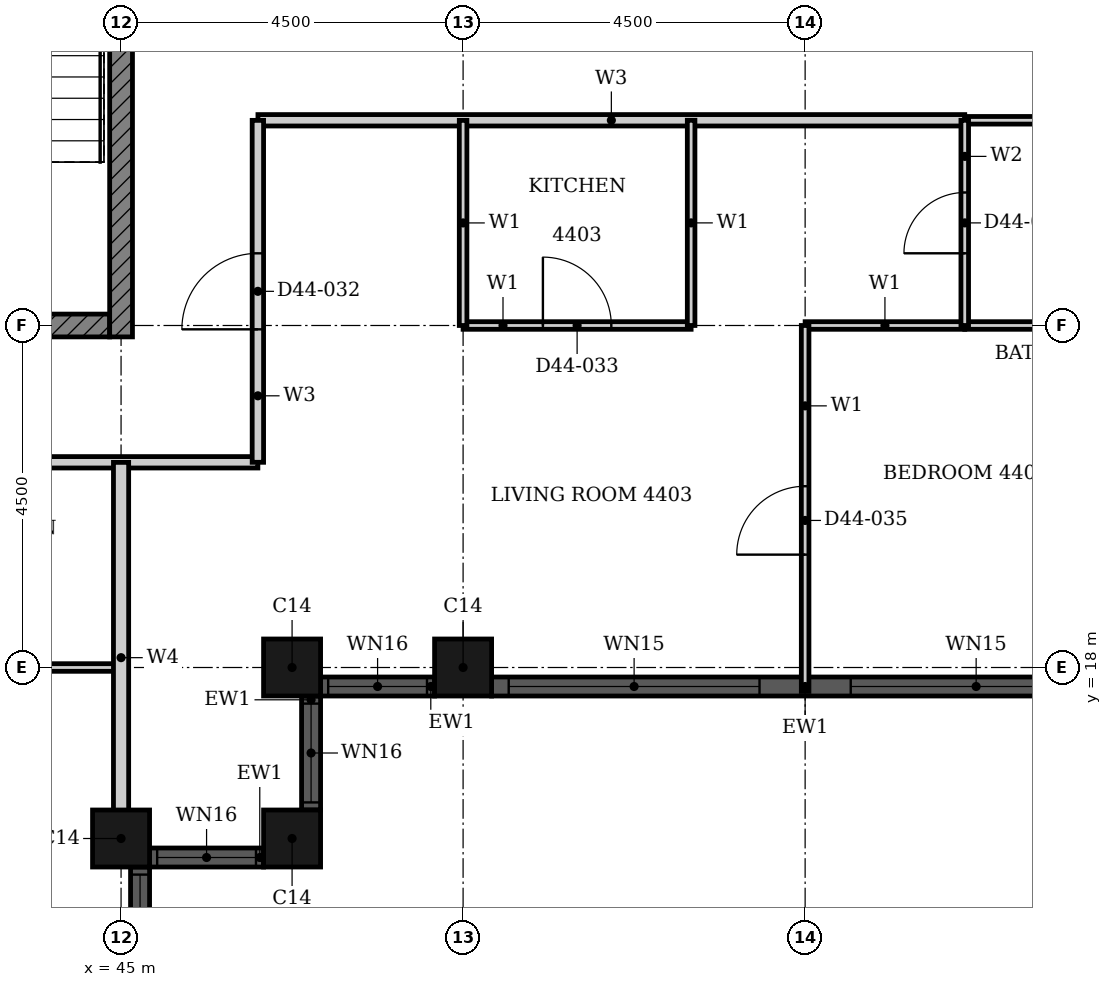
"""IFC4 building model, lengths in metres.
Left out: names, types, materials, properties, quantities, classifications, styles, units other than length and angle.
Written with IfcOpenShell. Run it as: python <this file> out.ifc"""

import sys

from ifc_helpers import new_model, si_unit, direction, frame, frame_2d, origin, origin_2d, place, context, subcontext, project, spatial, rectangle, hollow_rectangle, extrude, element, fill, save


model = new_model("IFC4")
c1 = context("Model", 3, precision=1e-05, world=origin(), true_north=direction((0.0, 1.0)))
c2 = subcontext(c1, "Body", "Model", "MODEL_VIEW")
j1 = project(units=[si_unit("LENGTHUNIT", "METRE"), si_unit("PLANEANGLEUNIT", "RADIAN")], contexts=[c1])
p1 = place(None, origin())
s1 = spatial("IfcSite", under=j1, at=p1, CompositionType="ELEMENT")
p2 = place(p1, origin())
s2 = spatial("IfcBuilding", under=s1, at=p2, CompositionType="ELEMENT")
p3 = place(p2, frame((0.0, 0.0, 176.5)))
s3 = spatial("IfcBuildingStorey", under=s2, at=p3, CompositionType="ELEMENT", Elevation=176.5)
for number, where, z_axis, x_axis in (
    (1, (45.0, 15.75, 0.0), (0.0, 0.0, 1.0), (1.0, 0.0, 0.0)),
    (2, (47.25, 15.75, 0.0), (0.0, 0.0, 1.0), (1.0, 0.0, 0.0)),
    (3, (47.25, 18.0, 0.0), (0.0, 0.0, 1.0), (1.0, 0.0, 0.0)),
    (4, (49.5, 18.0, 0.0), (0.0, 0.0, 1.0), (1.0, 0.0, 0.0)),
):
    element("IfcColumn", number, at=place(p3, frame(where, z_axis=z_axis, x_axis=x_axis)), inside=s3, PredefinedType="COLUMN", context=c2, shape_type="SweptSolid", body=[
        extrude(hollow_rectangle(XDim=0.75, YDim=0.75, WallThickness=0.024, at=origin_2d()), origin(), (0.0, 0.0, 1.0), 3.7),
    ])
p4 = place(p3, frame((45.25, 13.875, 0.0), z_axis=(0.0, 0.0, 1.0), x_axis=(0.0, 1.0, 0.0)))
e5 = element("IfcWall", 5, at=p4, inside=s3, PredefinedType="SOLIDWALL", context=c2, shape_type="SweptSolid", body=[
    extrude(rectangle(XDim=1.5, YDim=0.25, at=frame_2d((0.75, 0.0))), origin(), (0.0, 0.0, 1.0), 3.7),
])
p5 = place(p4, frame((0.1, 0.0, 0.9)))
e6 = element("IfcOpeningElement", 6, at=p5, cuts=e5, PredefinedType="OPENING", context=c2, shape_type="SweptSolid", body=[
    extrude(rectangle(XDim=1.3, YDim=1.85, at=frame_2d((0.65, 0.925))), frame((0.0, 0.135, 0.0), z_axis=(0.0, -1.0, 0.0), x_axis=(1.0, 0.0, 0.0)), (0.0, 0.0, 1.0), 0.27),
])
p6 = place(p3, frame((45.375, 15.5, 0.0), z_axis=(0.0, 0.0, 1.0), x_axis=(1.0, 0.0, 0.0)))
e7 = element("IfcWall", 7, at=p6, inside=s3, PredefinedType="SOLIDWALL", context=c2, shape_type="SweptSolid", body=[
    extrude(rectangle(XDim=1.5, YDim=0.25, at=frame_2d((0.75, 0.0))), origin(), (0.0, 0.0, 1.0), 3.7),
])
p7 = place(p6, frame((0.1, 0.0, 0.9)))
e8 = element("IfcOpeningElement", 8, at=p7, cuts=e7, PredefinedType="OPENING", context=c2, shape_type="SweptSolid", body=[
    extrude(rectangle(XDim=1.3, YDim=1.85, at=frame_2d((0.65, 0.925))), frame((0.0, 0.135, 0.0), z_axis=(0.0, -1.0, 0.0), x_axis=(1.0, 0.0, 0.0)), (0.0, 0.0, 1.0), 0.27),
])
p8 = place(p3, frame((47.5, 16.125, 0.0), z_axis=(0.0, 0.0, 1.0), x_axis=(0.0, 1.0, 0.0)))
e9 = element("IfcWall", 9, at=p8, inside=s3, PredefinedType="SOLIDWALL", context=c2, shape_type="SweptSolid", body=[
    extrude(rectangle(XDim=1.5, YDim=0.25, at=frame_2d((0.75, 0.0))), origin(), (0.0, 0.0, 1.0), 3.7),
])
p9 = place(p8, frame((0.1, 0.0, 0.9)))
e10 = element("IfcOpeningElement", 10, at=p9, cuts=e9, PredefinedType="OPENING", context=c2, shape_type="SweptSolid", body=[
    extrude(rectangle(XDim=1.3, YDim=1.85, at=frame_2d((0.65, 0.925))), frame((0.0, 0.135, 0.0), z_axis=(0.0, -1.0, 0.0), x_axis=(1.0, 0.0, 0.0)), (0.0, 0.0, 1.0), 0.27),
])
p10 = place(p3, frame((47.625, 17.75, 0.0), z_axis=(0.0, 0.0, 1.0), x_axis=(1.0, 0.0, 0.0)))
e11 = element("IfcWall", 11, at=p10, inside=s3, PredefinedType="SOLIDWALL", context=c2, shape_type="SweptSolid", body=[
    extrude(rectangle(XDim=1.5, YDim=0.25, at=frame_2d((0.75, 0.0))), origin(), (0.0, 0.0, 1.0), 3.7),
])
p11 = place(p10, frame((0.1, 0.0, 0.9)))
e12 = element("IfcOpeningElement", 12, at=p11, cuts=e11, PredefinedType="OPENING", context=c2, shape_type="SweptSolid", body=[
    extrude(rectangle(XDim=1.3, YDim=1.85, at=frame_2d((0.65, 0.925))), frame((0.0, 0.135, 0.0), z_axis=(0.0, -1.0, 0.0), x_axis=(1.0, 0.0, 0.0)), (0.0, 0.0, 1.0), 0.27),
])
p12 = place(p3, frame((49.875, 17.75, 0.0), z_axis=(0.0, 0.0, 1.0), x_axis=(1.0, 0.0, 0.0)))
e13 = element("IfcWall", 13, at=p12, inside=s3, PredefinedType="SOLIDWALL", context=c2, shape_type="SweptSolid", body=[
    extrude(rectangle(XDim=8.25, YDim=0.25, at=frame_2d((4.125, 0.0))), origin(), (0.0, 0.0, 1.0), 3.7),
])
p13 = place(p12, frame((0.225, 0.0, 0.45)))
e14 = element("IfcOpeningElement", 14, at=p13, cuts=e13, PredefinedType="OPENING", context=c2, shape_type="SweptSolid", body=[
    extrude(rectangle(XDim=3.3, YDim=2.3, at=frame_2d((1.65, 1.15))), frame((0.0, 0.135, 0.0), z_axis=(0.0, -1.0, 0.0), x_axis=(1.0, 0.0, 0.0)), (0.0, 0.0, 1.0), 0.27),
])
p14 = place(p12, frame((4.725, 0.0, 0.45)))
e15 = element("IfcOpeningElement", 15, at=p14, cuts=e13, PredefinedType="OPENING", context=c2, shape_type="SweptSolid", body=[
    extrude(rectangle(XDim=3.3, YDim=2.3, at=frame_2d((1.65, 1.15))), frame((0.0, 0.135, 0.0), z_axis=(0.0, -1.0, 0.0), x_axis=(1.0, 0.0, 0.0)), (0.0, 0.0, 1.0), 0.27),
])
p15 = place(p3, frame((32.911, 22.5, 0.0), z_axis=(0.0, 0.0, 1.0), x_axis=(1.0, 0.0, 0.0)))
e16 = element("IfcWall", 16, at=p15, inside=s3, PredefinedType="SHEAR", context=c2, shape_type="SweptSolid", body=[
    extrude(rectangle(XDim=11.939, YDim=0.3, at=frame_2d((5.97, 0.0))), origin(), (0.0, 0.0, 1.0), 3.4),
])
p16 = place(p15, frame((5.404, 0.0, 0.0)))
e17 = element("IfcOpeningElement", 17, at=p16, cuts=e16, PredefinedType="OPENING", context=c2, shape_type="SweptSolid", body=[
    extrude(rectangle(XDim=1.8, YDim=2.1, at=frame_2d((0.9, 1.05))), frame((0.0, 0.16, 0.0), z_axis=(0.0, -1.0, 0.0), x_axis=(1.0, 0.0, 0.0)), (0.0, 0.0, 1.0), 0.32),
])
p17 = place(p3, frame((45.0, 22.35, 0.0), z_axis=(0.0, 0.0, 1.0), x_axis=(0.0, 1.0, 0.0)))
e18 = element("IfcWall", 18, at=p17, inside=s3, PredefinedType="SHEAR", context=c2, shape_type="SweptSolid", body=[
    extrude(rectangle(XDim=9.3, YDim=0.3, at=frame_2d((4.65, 0.0))), origin(), (0.0, 0.0, 1.0), 3.4),
])
p18 = place(p3, frame((38.4, 20.7, 0.0), z_axis=(0.0, 0.0, 1.0), x_axis=(1.0, 0.0, 0.0)))
e19 = element("IfcWall", 19, at=p18, inside=s3, PredefinedType="PARTITIONING", context=c2, shape_type="SweptSolid", body=[
    extrude(rectangle(XDim=8.4, YDim=0.15, at=frame_2d((4.2, 0.0))), origin(), (0.0, 0.0, 1.0), 3.4),
])
p19 = place(p3, frame((46.801, 25.2, 0.0), z_axis=(0.0, 0.0, 1.0), x_axis=(1.0, 0.0, 0.0)))
e20 = element("IfcWall", 20, at=p19, inside=s3, PredefinedType="PARTITIONING", context=c2, shape_type="SweptSolid", body=[
    extrude(rectangle(XDim=9.299, YDim=0.15, at=frame_2d((4.649, 0.0))), origin(), (0.0, 0.0, 1.0), 3.4),
])
p20 = place(p3, frame((46.8, 20.7, 0.0), z_axis=(0.0, 0.0, 1.0), x_axis=(0.0, 1.0, 0.0)))
e21 = element("IfcWall", 21, at=p20, inside=s3, PredefinedType="PARTITIONING", context=c2, shape_type="SweptSolid", body=[
    extrude(rectangle(XDim=4.499, YDim=0.15, at=frame_2d((2.25, 0.0))), origin(), (0.0, 0.0, 1.0), 3.4),
])
p21 = place(p20, frame((1.75, 0.0, 0.0)))
e22 = element("IfcOpeningElement", 22, at=p21, cuts=e21, PredefinedType="OPENING", context=c2, shape_type="SweptSolid", body=[
    extrude(rectangle(XDim=1.0, YDim=2.2, at=frame_2d((0.5, 1.1))), frame((0.0, 0.085, 0.0), z_axis=(0.0, -1.0, 0.0), x_axis=(1.0, 0.0, 0.0)), (0.0, 0.0, 1.0), 0.17),
])
p22 = place(p3, frame((42.0, 18.0, 0.0), z_axis=(0.0, 0.0, 1.0), x_axis=(1.0, 0.0, 0.0)))
e23 = element("IfcWall", 23, at=p22, inside=s3, PredefinedType="PARTITIONING", context=c2, shape_type="SweptSolid", body=[
    extrude(rectangle(XDim=3.0, YDim=0.1, at=frame_2d((1.5, 0.0))), origin(), (0.0, 0.0, 1.0), 3.4),
])
p23 = place(p22, frame((1.05, 0.0, 0.0)))
e24 = element("IfcOpeningElement", 24, at=p23, cuts=e23, PredefinedType="OPENING", context=c2, shape_type="SweptSolid", body=[
    extrude(rectangle(XDim=0.9, YDim=2.1, at=frame_2d((0.45, 1.05))), frame((0.0, 0.06, 0.0), z_axis=(0.0, -1.0, 0.0), x_axis=(1.0, 0.0, 0.0)), (0.0, 0.0, 1.0), 0.12),
])
p24 = place(p3, frame((54.0, 22.5, 0.0), z_axis=(0.0, 0.0, 1.0), x_axis=(1.0, 0.0, 0.0)))
e25 = element("IfcWall", 25, at=p24, inside=s3, PredefinedType="PARTITIONING", context=c2, shape_type="SweptSolid", body=[
    extrude(rectangle(XDim=2.1, YDim=0.1, at=frame_2d((1.05, 0.0))), origin(), (0.0, 0.0, 1.0), 2.68),
])
p25 = place(p3, frame((49.5, 22.5, 0.0), z_axis=(0.0, 0.0, 1.0), x_axis=(1.0, 0.0, 0.0)))
e26 = element("IfcWall", 26, at=p25, inside=s3, PredefinedType="PARTITIONING", context=c2, shape_type="SweptSolid", body=[
    extrude(rectangle(XDim=3.0, YDim=0.1, at=frame_2d((1.5, 0.0))), origin(), (0.0, 0.0, 1.0), 2.68),
])
p26 = place(p25, frame((1.05, 0.0, 0.0)))
e27 = element("IfcOpeningElement", 27, at=p26, cuts=e26, PredefinedType="OPENING", context=c2, shape_type="SweptSolid", body=[
    extrude(rectangle(XDim=0.9, YDim=2.1, at=frame_2d((0.45, 1.05))), frame((0.0, 0.06, 0.0), z_axis=(0.0, -1.0, 0.0), x_axis=(1.0, 0.0, 0.0)), (0.0, 0.0, 1.0), 0.12),
])
p27 = place(p3, frame((49.5, 22.5, 0.0), z_axis=(0.0, 0.0, 1.0), x_axis=(0.0, 1.0, 0.0)))
e28 = element("IfcWall", 28, at=p27, inside=s3, PredefinedType="PARTITIONING", context=c2, shape_type="SweptSolid", body=[
    extrude(rectangle(XDim=2.699, YDim=0.1, at=frame_2d((1.35, 0.0))), origin(), (0.0, 0.0, 1.0), 2.48),
])
p28 = place(p3, frame((52.5, 22.5, 0.0), z_axis=(0.0, 0.0, 1.0), x_axis=(0.0, 1.0, 0.0)))
e29 = element("IfcWall", 29, at=p28, inside=s3, PredefinedType="PARTITIONING", context=c2, shape_type="SweptSolid", body=[
    extrude(rectangle(XDim=2.7, YDim=0.1, at=frame_2d((1.35, 0.0))), origin(), (0.0, 0.0, 1.0), 3.4),
])
p29 = place(p3, frame((54.0, 17.685, 0.0), z_axis=(0.0, 0.0, 1.0), x_axis=(0.0, 1.0, 0.0)))
e30 = element("IfcWall", 30, at=p29, inside=s3, PredefinedType="PARTITIONING", context=c2, shape_type="SweptSolid", body=[
    extrude(rectangle(XDim=4.815, YDim=0.1, at=frame_2d((2.407, 0.0))), origin(), (0.0, 0.0, 1.0), 3.4),
])
p30 = place(p29, frame((1.8, 0.0, 0.0)))
e31 = element("IfcOpeningElement", 31, at=p30, cuts=e30, PredefinedType="OPENING", context=c2, shape_type="SweptSolid", body=[
    extrude(rectangle(XDim=0.9, YDim=2.1, at=frame_2d((0.45, 1.05))), frame((0.0, 0.06, 0.0), z_axis=(0.0, -1.0, 0.0), x_axis=(1.0, 0.0, 0.0)), (0.0, 0.0, 1.0), 0.12),
])
p31 = place(p3, frame((45.0, 15.56, 0.0), z_axis=(0.0, 0.0, 1.0), x_axis=(0.0, 1.0, 0.0)))
e32 = element("IfcWall", 32, at=p31, inside=s3, PredefinedType="PARTITIONING", context=c2, shape_type="SweptSolid", body=[
    extrude(rectangle(XDim=5.139, YDim=0.2, at=frame_2d((2.569, 0.0))), origin(), (0.0, 0.0, 1.0), 3.4),
])
p32 = place(p3, frame((56.1, 22.5, 0.0), z_axis=(0.0, 0.0, 1.0), x_axis=(1.0, 0.0, 0.0)))
e33 = element("IfcWall", 33, at=p32, inside=s3, PredefinedType="PARTITIONING", context=c2, shape_type="SweptSolid", body=[
    extrude(rectangle(XDim=2.4, YDim=0.1, at=frame_2d((1.2, 0.0))), origin(), (0.0, 0.0, 1.0), 2.68),
])
p33 = place(p3, frame((56.1, 25.2, 0.0), z_axis=(0.0, 0.0, 1.0), x_axis=(1.0, 0.0, 0.0)))
e34 = element("IfcWall", 34, at=p33, inside=s3, PredefinedType="PARTITIONING", context=c2, shape_type="SweptSolid", body=[
    extrude(rectangle(XDim=2.4, YDim=0.1, at=frame_2d((1.2, 0.0))), origin(), (0.0, 0.0, 1.0), 3.4),
])
p34 = place(p3, frame((56.1, 22.5, 0.0), z_axis=(0.0, 0.0, 1.0), x_axis=(0.0, 1.0, 0.0)))
e35 = element("IfcWall", 35, at=p34, inside=s3, PredefinedType="PARTITIONING", context=c2, shape_type="SweptSolid", body=[
    extrude(rectangle(XDim=2.7, YDim=0.1, at=frame_2d((1.35, 0.0))), origin(), (0.0, 0.0, 1.0), 3.4),
])
p35 = place(p34, frame((0.95, 0.0, 0.0)))
e36 = element("IfcOpeningElement", 36, at=p35, cuts=e35, PredefinedType="OPENING", context=c2, shape_type="SweptSolid", body=[
    extrude(rectangle(XDim=0.8, YDim=2.1, at=frame_2d((0.4, 1.05))), frame((0.0, 0.06, 0.0), z_axis=(0.0, -1.0, 0.0), x_axis=(1.0, 0.0, 0.0)), (0.0, 0.0, 1.0), 0.12),
])
p36 = place(p5, origin())
e37 = element("IfcWindow", 37, at=p36, inside=s3, PartitioningType="SINGLE_PANEL", PredefinedType="WINDOW", context=c2, shape_type="SweptSolid", body=[
    extrude(rectangle(XDim=1.3, YDim=1.85, at=frame_2d((0.65, 0.925))), frame((0.0, 0.03, 0.0), z_axis=(0.0, -1.0, 0.0), x_axis=(1.0, 0.0, 0.0)), (0.0, 0.0, 1.0), 0.06),
])
fill(e6, e37)
p37 = place(p7, origin())
e38 = element("IfcWindow", 38, at=p37, inside=s3, PartitioningType="SINGLE_PANEL", PredefinedType="WINDOW", context=c2, shape_type="SweptSolid", body=[
    extrude(rectangle(XDim=1.3, YDim=1.85, at=frame_2d((0.65, 0.925))), frame((0.0, 0.03, 0.0), z_axis=(0.0, -1.0, 0.0), x_axis=(1.0, 0.0, 0.0)), (0.0, 0.0, 1.0), 0.06),
])
fill(e8, e38)
p38 = place(p9, origin())
e39 = element("IfcWindow", 39, at=p38, inside=s3, PartitioningType="SINGLE_PANEL", PredefinedType="WINDOW", context=c2, shape_type="SweptSolid", body=[
    extrude(rectangle(XDim=1.3, YDim=1.85, at=frame_2d((0.65, 0.925))), frame((0.0, 0.03, 0.0), z_axis=(0.0, -1.0, 0.0), x_axis=(1.0, 0.0, 0.0)), (0.0, 0.0, 1.0), 0.06),
])
fill(e10, e39)
p39 = place(p11, origin())
e40 = element("IfcWindow", 40, at=p39, inside=s3, PartitioningType="SINGLE_PANEL", PredefinedType="WINDOW", context=c2, shape_type="SweptSolid", body=[
    extrude(rectangle(XDim=1.3, YDim=1.85, at=frame_2d((0.65, 0.925))), frame((0.0, 0.03, 0.0), z_axis=(0.0, -1.0, 0.0), x_axis=(1.0, 0.0, 0.0)), (0.0, 0.0, 1.0), 0.06),
])
fill(e12, e40)
p40 = place(p13, origin())
e41 = element("IfcWindow", 41, at=p40, inside=s3, PartitioningType="SINGLE_PANEL", PredefinedType="WINDOW", context=c2, shape_type="SweptSolid", body=[
    extrude(rectangle(XDim=3.3, YDim=2.3, at=frame_2d((1.65, 1.15))), frame((0.0, 0.03, 0.0), z_axis=(0.0, -1.0, 0.0), x_axis=(1.0, 0.0, 0.0)), (0.0, 0.0, 1.0), 0.06),
])
fill(e14, e41)
p41 = place(p14, origin())
e42 = element("IfcWindow", 42, at=p41, inside=s3, PartitioningType="SINGLE_PANEL", PredefinedType="WINDOW", context=c2, shape_type="SweptSolid", body=[
    extrude(rectangle(XDim=3.3, YDim=2.3, at=frame_2d((1.65, 1.15))), frame((0.0, 0.03, 0.0), z_axis=(0.0, -1.0, 0.0), x_axis=(1.0, 0.0, 0.0)), (0.0, 0.0, 1.0), 0.06),
])
fill(e15, e42)
p42 = place(p21, origin())
e43 = element("IfcDoor", 43, at=p42, inside=s3, OperationType="SINGLE_SWING_LEFT", PredefinedType="DOOR", context=c2, shape_type="SweptSolid", body=[
    extrude(rectangle(XDim=1.0, YDim=2.2, at=frame_2d((0.5, 1.1))), frame((0.0, 0.025, 0.0), z_axis=(0.0, -1.0, 0.0), x_axis=(1.0, 0.0, 0.0)), (0.0, 0.0, 1.0), 0.05),
])
fill(e22, e43)
p43 = place(p26, origin())
e44 = element("IfcDoor", 44, at=p43, inside=s3, OperationType="SINGLE_SWING_LEFT", PredefinedType="DOOR", context=c2, shape_type="SweptSolid", body=[
    extrude(rectangle(XDim=0.9, YDim=2.1, at=frame_2d((0.45, 1.05))), frame((0.0, 0.025, 0.0), z_axis=(0.0, -1.0, 0.0), x_axis=(1.0, 0.0, 0.0)), (0.0, 0.0, 1.0), 0.05),
])
fill(e27, e44)
p44 = place(p35, origin())
e45 = element("IfcDoor", 45, at=p44, inside=s3, OperationType="SINGLE_SWING_LEFT", PredefinedType="DOOR", context=c2, shape_type="SweptSolid", body=[
    extrude(rectangle(XDim=0.8, YDim=2.1, at=frame_2d((0.4, 1.05))), frame((0.0, 0.025, 0.0), z_axis=(0.0, -1.0, 0.0), x_axis=(1.0, 0.0, 0.0)), (0.0, 0.0, 1.0), 0.05),
])
fill(e36, e45)
p45 = place(p30, origin())
e46 = element("IfcDoor", 46, at=p45, inside=s3, OperationType="SINGLE_SWING_LEFT", PredefinedType="DOOR", context=c2, shape_type="SweptSolid", body=[
    extrude(rectangle(XDim=0.9, YDim=2.1, at=frame_2d((0.45, 1.05))), frame((0.0, 0.025, 0.0), z_axis=(0.0, -1.0, 0.0), x_axis=(1.0, 0.0, 0.0)), (0.0, 0.0, 1.0), 0.05),
])
fill(e31, e46)
save(model, sys.argv[1])
